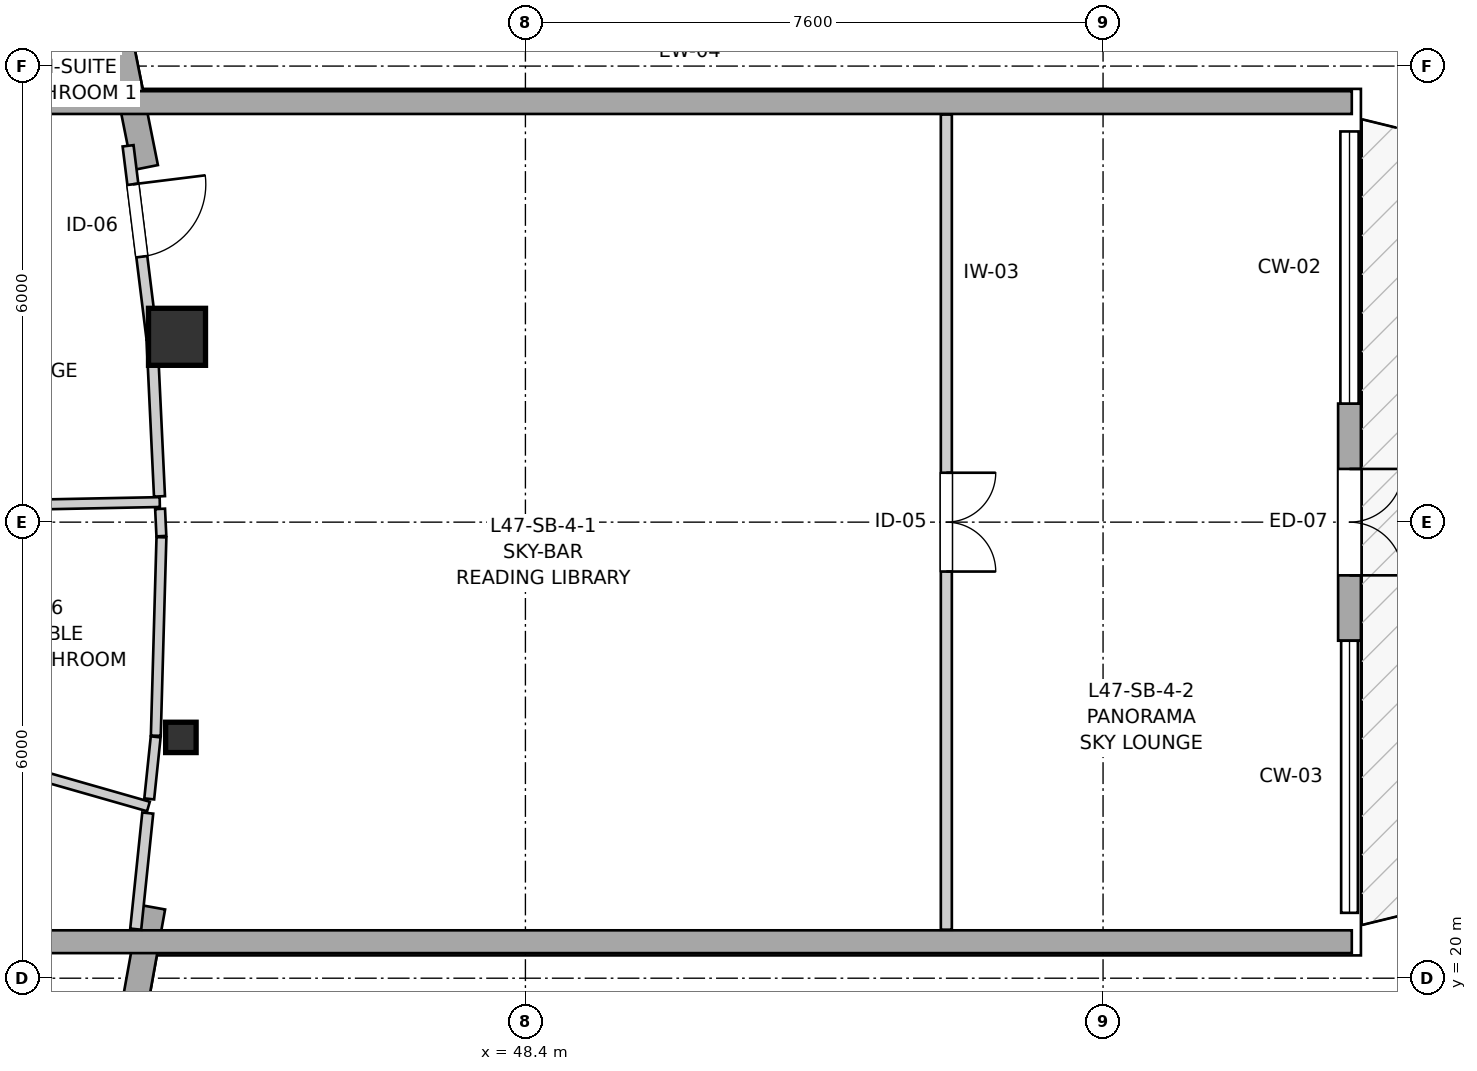
"""IFC4 building model, lengths in metres.
Left out: names, types, materials, properties, quantities, classifications, styles, units other than length and angle.
Written with IfcOpenShell. Run it as: python <this file> out.ifc"""

import sys

from ifc_helpers import new_model, si_unit, direction, frame, frame_2d, origin, origin_2d, place, context, subcontext, project, spatial, rectangle, i_section, extrude, source, transform, mapped, element, fill, save


model = new_model("IFC4")
c1 = context("Model", 3, precision=1e-05, world=origin(), true_north=direction((0.0, 1.0)))
c2 = subcontext(c1, "Body", "Model", "MODEL_VIEW")
j1 = project(units=[si_unit("LENGTHUNIT", "METRE"), si_unit("PLANEANGLEUNIT", "RADIAN")], contexts=[c1])
p1 = place(None, origin())
s1 = spatial("IfcSite", under=j1, at=p1, CompositionType="ELEMENT")
p2 = place(p1, origin())
s2 = spatial("IfcBuilding", under=s1, at=p2, CompositionType="ELEMENT")
p3 = place(p2, frame((0.0, 0.0, 158.6)))
s3 = spatial("IfcBuildingStorey", under=s2, at=p3, CompositionType="ELEMENT", Elevation=158.6)
m1 = source(origin(), c2, "Body", "SweptSolid", [
    extrude(i_section(OverallWidth=0.401, OverallDepth=0.399, WebThickness=0.023, FlangeThickness=0.036, FilletRadius=0.015, at=origin_2d()), origin(), (0.0, 0.0, 1.0), 2.95),
])
p4 = place(p3, frame((43.867, 23.168, 0.0), z_axis=(0.0, 0.0, 1.0), x_axis=(1.0, 0.0, 0.0)))
e1 = element("IfcColumn", 1, at=p4, inside=s3, PredefinedType="PILASTER", context=c2, shape_type="MappedRepresentation", body=[
    mapped(m1, transform((0.0, 0.0, 0.0), x_axis=(1.0, 0.0, 0.0), y_axis=(0.0, 1.0, 0.0), z_axis=(0.0, 0.0, 1.0), scale=1.0)),
])
m2 = source(origin(), c2, "Body", "SweptSolid", [
    extrude(rectangle(XDim=0.75, YDim=0.75, at=origin_2d()), origin(), (0.0, 0.0, 1.0), 2.95),
])
p5 = place(p3, frame((43.816, 28.438, 0.0), z_axis=(0.0, 0.0, 1.0), x_axis=(1.0, 0.0, 0.0)))
e2 = element("IfcColumn", 2, at=p5, inside=s3, PredefinedType="COLUMN", context=c2, shape_type="MappedRepresentation", body=[
    mapped(m2, transform((0.0, 0.0, 0.0), x_axis=(1.0, 0.0, 0.0), y_axis=(0.0, 1.0, 0.0), z_axis=(0.0, 0.0, 1.0), scale=1.0)),
])
p6 = place(p3, frame((42.977, 18.073, 0.0), z_axis=(0.0, 0.0, 1.0), x_axis=(0.177185533742, 0.984177467042, 0.0)))
e3 = element("IfcWall", 3, at=p6, inside=s3, PredefinedType="SOLIDWALL", context=c2, shape_type="SweptSolid", body=[
    extrude(rectangle(XDim=2.907, YDim=0.34, at=frame_2d((1.454, 0.0))), origin(), (0.0, 0.0, 1.0), 2.53),
])
p7 = place(p3, frame((43.398, 30.664, 0.0), z_axis=(0.0, 0.0, 1.0), x_axis=(-0.196147002944, 0.980574501624, 0.0)))
e4 = element("IfcWall", 4, at=p7, inside=s3, PredefinedType="SOLIDWALL", context=c2, shape_type="SweptSolid", body=[
    extrude(rectangle(XDim=3.042, YDim=0.34, at=frame_2d((1.521, 0.0))), origin(), (0.0, 0.0, 1.0), 2.53),
])
p8 = place(p7, frame((2.149, 0.0, 0.82)))
e5 = element("IfcOpeningElement", 5, at=p8, cuts=e4, PredefinedType="OPENING", context=c2, shape_type="SweptSolid", body=[
    extrude(rectangle(XDim=0.58, YDim=1.35, at=frame_2d((0.29, 0.675))), frame((0.0, 0.18, 0.0), z_axis=(0.0, -1.0, 0.0), x_axis=(1.0, 0.0, 0.0)), (0.0, 0.0, 1.0), 0.36),
])
for number, where, z_axis, x_axis in (
    (6, (41.85, 31.52, 0.0), (0.0, 0.0, 1.0), (1.0, 0.0, 0.0)),
    (7, (41.85, 20.48, 0.0), (0.0, 0.0, 1.0), (1.0, 0.0, 0.0)),
):
    element("IfcWall", number, at=place(p3, frame(where, z_axis=z_axis, x_axis=x_axis)), inside=s3, PredefinedType="SOLIDWALL", context=c2, shape_type="SweptSolid", body=[
        extrude(rectangle(XDim=17.423, YDim=0.3, at=frame_2d((8.711, 0.0))), origin(), (0.0, 0.0, 1.0), 2.13),
    ])
p9 = place(p3, frame((59.243, 27.56, 0.0), z_axis=(0.0, 0.0, 1.0), x_axis=(0.0, -1.0, 0.0)))
e8 = element("IfcWall", 8, at=p9, inside=s3, PredefinedType="SOLIDWALL", context=c2, shape_type="SweptSolid", body=[
    extrude(rectangle(XDim=3.12, YDim=0.3, at=frame_2d((1.56, 0.0))), origin(), (0.0, 0.0, 1.0), 2.3),
])
p10 = place(p9, frame((0.86, 0.0, 0.0)))
e9 = element("IfcOpeningElement", 9, at=p10, cuts=e8, PredefinedType="OPENING", context=c2, shape_type="SweptSolid", body=[
    extrude(rectangle(XDim=1.4, YDim=2.15, at=frame_2d((0.7, 1.075))), frame((0.0, 0.16, 0.0), z_axis=(0.0, -1.0, 0.0), x_axis=(1.0, 0.0, 0.0)), (0.0, 0.0, 1.0), 0.32),
])
p11 = place(p3, frame((53.938, 31.362, 0.0), z_axis=(0.0, 0.0, 1.0), x_axis=(0.0, -1.0, 0.0)))
e10 = element("IfcWall", 10, at=p11, inside=s3, PredefinedType="PARTITIONING", context=c2, shape_type="SweptSolid", body=[
    extrude(rectangle(XDim=10.724, YDim=0.145, at=frame_2d((5.362, 0.0))), origin(), (0.0, 0.0, 1.0), 2.95),
])
p12 = place(p11, frame((4.712, 0.0, 0.0)))
e11 = element("IfcOpeningElement", 11, at=p12, cuts=e10, PredefinedType="OPENING", context=c2, shape_type="SweptSolid", body=[
    extrude(rectangle(XDim=1.3, YDim=2.1, at=frame_2d((0.65, 1.05))), frame((0.0, 0.083, 0.0), z_axis=(0.0, -1.0, 0.0), x_axis=(1.0, 0.0, 0.0)), (0.0, 0.0, 1.0), 0.165),
])
p13 = place(p3, frame((43.172, 30.951, 0.0), z_axis=(0.0, 0.0, 1.0), x_axis=(0.122990311665, -0.99240787141, 0.0)))
e12 = element("IfcWall", 12, at=p13, inside=s3, PredefinedType="PARTITIONING", context=c2, shape_type="SweptSolid", body=[
    extrude(rectangle(XDim=2.561, YDim=0.145, at=frame_2d((1.28, 0.0))), origin(), (0.0, 0.0, 1.0), 2.518),
])
p14 = place(p13, frame((0.51, 0.0, 0.0)))
e13 = element("IfcOpeningElement", 13, at=p14, cuts=e12, PredefinedType="OPENING", context=c2, shape_type="SweptSolid", body=[
    extrude(rectangle(XDim=0.96, YDim=2.1, at=frame_2d((0.48, 1.05))), frame((0.0, 0.083, 0.0), z_axis=(0.0, -1.0, 0.0), x_axis=(1.0, 0.0, 0.0)), (0.0, 0.0, 1.0), 0.165),
])
p15 = place(p3, frame((38.436, 23.689, 0.0), z_axis=(0.0, 0.0, 1.0), x_axis=(0.961531027854, -0.274696345942, 0.0)))
e14 = element("IfcWall", 14, at=p15, inside=s3, PredefinedType="PARTITIONING", context=c2, shape_type="SweptSolid", body=[
    extrude(rectangle(XDim=5.205, YDim=0.13, at=frame_2d((2.602, 0.0))), origin(), (0.0, 0.0, 1.0), 2.95),
])
p16 = place(p3, frame((38.419, 26.161, 0.0), z_axis=(0.0, 0.0, 1.0), x_axis=(0.999801492135, 0.019924264719, 0.0)))
e15 = element("IfcWall", 15, at=p16, inside=s3, PredefinedType="PARTITIONING", context=c2, shape_type="SweptSolid", body=[
    extrude(rectangle(XDim=5.171, YDim=0.13, at=frame_2d((2.585, 0.0))), origin(), (0.0, 0.0, 1.0), 2.95),
])
p17 = place(p3, frame((43.537, 23.19, 0.0), z_axis=(0.0, 0.0, 1.0), x_axis=(0.028319632762, 0.999598918767, 0.0)))
e16 = element("IfcWall", 16, at=p17, inside=s3, PredefinedType="PARTITIONING", context=c2, shape_type="SweptSolid", body=[
    extrude(rectangle(XDim=2.612, YDim=0.13, at=frame_2d((1.306, 0.0))), origin(), (0.0, 0.0, 1.0), 2.518),
])
p18 = place(p3, frame((43.488, 28.395, 0.0), z_axis=(0.0, 0.0, 1.0), x_axis=(0.047441179451, -0.998874033346, 0.0)))
e17 = element("IfcWall", 17, at=p18, inside=s3, PredefinedType="PARTITIONING", context=c2, shape_type="SweptSolid", body=[
    extrude(rectangle(XDim=2.058, YDim=0.145, at=frame_2d((1.029, 0.0))), origin(), (0.0, 0.0, 1.0), 2.518),
])
p19 = place(p3, frame((43.273, 20.646, 0.0), z_axis=(0.0, 0.0, 1.0), x_axis=(0.103045636414, 0.99467662927, 0.0)))
e18 = element("IfcWall", 18, at=p19, inside=s3, PredefinedType="PARTITIONING", context=c2, shape_type="SweptSolid", body=[
    extrude(rectangle(XDim=1.535, YDim=0.145, at=frame_2d((0.768, 0.0))), origin(), (0.0, 0.0, 1.0), 2.518),
])
p20 = place(p3, frame((41.778, 31.926, 0.0), z_axis=(0.0, 0.0, 1.0), x_axis=(0.887683122967, 0.460454854681, 0.0)))
e19 = element("IfcWall", 19, at=p20, inside=s3, PredefinedType="PARTITIONING", context=c2, shape_type="SweptSolid", body=[
    extrude(rectangle(XDim=1.19, YDim=0.145, at=frame_2d((0.595, 0.0))), origin(), (0.0, 0.0, 1.0), 2.95),
])
p21 = place(p3, frame((43.45, 22.359, 0.0), z_axis=(0.0, 0.0, 1.0), x_axis=(0.103538633142, 0.994625432737, 0.0)))
e20 = element("IfcWall", 20, at=p21, inside=s3, PredefinedType="PARTITIONING", context=c2, shape_type="SweptSolid", body=[
    extrude(rectangle(XDim=0.821, YDim=0.13, at=frame_2d((0.41, 0.0))), origin(), (0.0, 0.0, 1.0), 2.518),
])
p22 = place(p3, frame((43.593, 26.174, 0.0), z_axis=(0.0, 0.0, 1.0), x_axis=(0.04762980516, -0.998865056782, 0.0)))
e21 = element("IfcWall", 21, at=p22, inside=s3, PredefinedType="PARTITIONING", context=c2, shape_type="SweptSolid", body=[
    extrude(rectangle(XDim=0.359, YDim=0.13, at=frame_2d((0.179, 0.0))), origin(), (0.0, 0.0, 1.0), 2.518),
])
m3 = source(origin(), c2, "Body", "SweptSolid", [
    extrude(rectangle(XDim=1.4, YDim=2.15, at=frame_2d((0.7, 1.075))), frame((0.0, 0.025, 0.0), z_axis=(0.0, -1.0, 0.0), x_axis=(1.0, 0.0, 0.0)), (0.0, 0.0, 1.0), 0.05),
])
p23 = place(p10, origin())
e22 = element("IfcDoor", 22, at=p23, inside=s3, OperationType="DOUBLE_DOOR_SINGLE_SWING", PredefinedType="DOOR", context=c2, shape_type="MappedRepresentation", body=[
    mapped(m3, transform((0.0, 0.0, 0.0), x_axis=(1.0, 0.0, 0.0), y_axis=(0.0, 1.0, 0.0), z_axis=(0.0, 0.0, 1.0), scale=1.0)),
])
fill(e9, e22)
m4 = source(origin(), c2, "Body", "SweptSolid", [
    extrude(rectangle(XDim=1.3, YDim=2.1, at=frame_2d((0.65, 1.05))), frame((0.0, 0.025, 0.0), z_axis=(0.0, -1.0, 0.0), x_axis=(1.0, 0.0, 0.0)), (0.0, 0.0, 1.0), 0.05),
])
p24 = place(p12, origin())
e23 = element("IfcDoor", 23, at=p24, inside=s3, OperationType="DOUBLE_DOOR_SINGLE_SWING", PredefinedType="DOOR", context=c2, shape_type="MappedRepresentation", body=[
    mapped(m4, transform((0.0, 0.0, 0.0), x_axis=(1.0, 0.0, 0.0), y_axis=(0.0, 1.0, 0.0), z_axis=(0.0, 0.0, 1.0), scale=1.0)),
])
fill(e11, e23)
m5 = source(origin(), c2, "Body", "SweptSolid", [
    extrude(rectangle(XDim=0.96, YDim=2.1, at=frame_2d((0.48, 1.05))), frame((0.0, 0.025, 0.0), z_axis=(0.0, -1.0, 0.0), x_axis=(1.0, 0.0, 0.0)), (0.0, 0.0, 1.0), 0.05),
])
p25 = place(p14, origin())
e24 = element("IfcDoor", 24, at=p25, inside=s3, OperationType="SINGLE_SWING_LEFT", PredefinedType="DOOR", context=c2, shape_type="MappedRepresentation", body=[
    mapped(m5, transform((0.0, 0.0, 0.0), x_axis=(1.0, 0.0, 0.0), y_axis=(0.0, 1.0, 0.0), z_axis=(0.0, 0.0, 1.0), scale=1.0)),
])
fill(e13, e24)
save(model, sys.argv[1])
